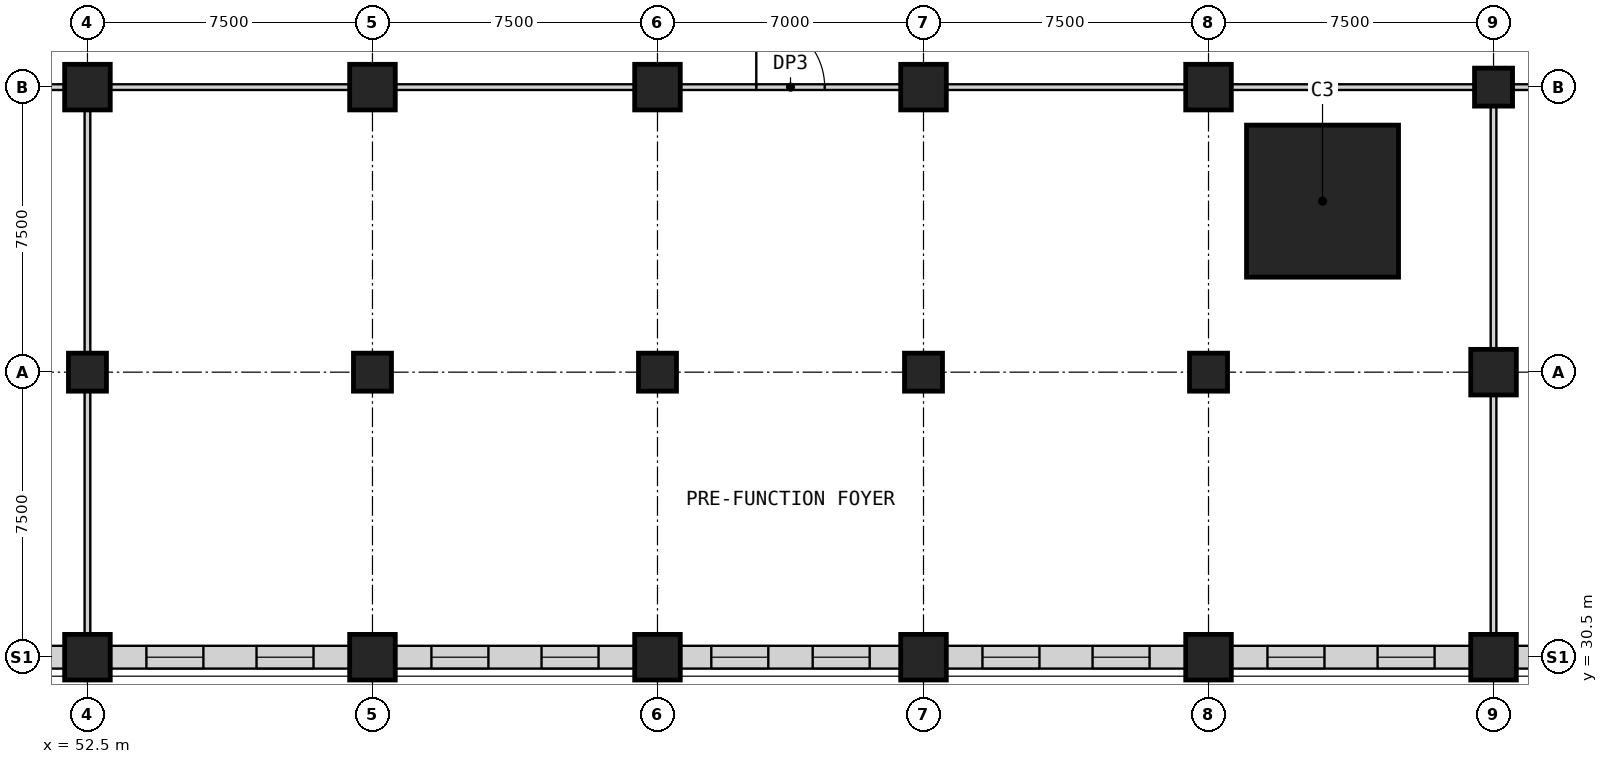
"""IFC4 building model, lengths in metres.
Left out: names, types, materials, properties, quantities, classifications, styles, units other than length and angle.
Written with IfcOpenShell. Run it as: python <this file> out.ifc"""

import sys

from ifc_helpers import new_model, si_unit, direction, frame, frame_2d, origin, origin_2d, place, context, subcontext, project, spatial, rectangle, extrude, element, fill, save


model = new_model("IFC4")
c1 = context("Model", 3, precision=1e-05, world=origin(), true_north=direction((0.0, 1.0)))
c2 = subcontext(c1, "Body", "Model", "MODEL_VIEW")
j1 = project(units=[si_unit("LENGTHUNIT", "METRE"), si_unit("PLANEANGLEUNIT", "RADIAN")], contexts=[c1])
p1 = place(None, origin())
s1 = spatial("IfcSite", under=j1, at=p1, CompositionType="ELEMENT")
p2 = place(p1, origin())
s2 = spatial("IfcBuilding", under=s1, at=p2, CompositionType="ELEMENT")
p3 = place(p2, frame((0.0, 0.0, 23.5)))
s3 = spatial("IfcBuildingStorey", under=s2, at=p3, CompositionType="ELEMENT", Elevation=23.5)
p4 = place(p3, frame((52.5, 38.0, 0.0), z_axis=(0.0, 0.0, 1.0), x_axis=(1.0, 0.0, 0.0)))
e1 = element("IfcColumn", 1, at=p4, inside=s3, PredefinedType="COLUMN", context=c2, shape_type="SweptSolid", body=[
    extrude(rectangle(XDim=1.0, YDim=1.0, at=origin_2d()), origin(), (0.0, 0.0, 1.0), 5.5),
])
p5 = place(p3, frame((52.5, 45.5, 0.0), z_axis=(0.0, 0.0, 1.0), x_axis=(1.0, 0.0, 0.0)))
e2 = element("IfcColumn", 2, at=p5, inside=s3, PredefinedType="COLUMN", context=c2, shape_type="SweptSolid", body=[
    extrude(rectangle(XDim=1.2, YDim=1.2, at=origin_2d()), origin(), (0.0, 0.0, 1.0), 5.5),
])
p6 = place(p3, frame((60.0, 38.0, 0.0), z_axis=(0.0, 0.0, 1.0), x_axis=(1.0, 0.0, 0.0)))
e3 = element("IfcColumn", 3, at=p6, inside=s3, PredefinedType="COLUMN", context=c2, shape_type="SweptSolid", body=[
    extrude(rectangle(XDim=1.0, YDim=1.0, at=origin_2d()), origin(), (0.0, 0.0, 1.0), 5.5),
])
p7 = place(p3, frame((60.0, 45.5, 0.0), z_axis=(0.0, 0.0, 1.0), x_axis=(1.0, 0.0, 0.0)))
e4 = element("IfcColumn", 4, at=p7, inside=s3, PredefinedType="COLUMN", context=c2, shape_type="SweptSolid", body=[
    extrude(rectangle(XDim=1.2, YDim=1.2, at=origin_2d()), origin(), (0.0, 0.0, 1.0), 5.5),
])
p8 = place(p3, frame((67.5, 38.0, 0.0), z_axis=(0.0, 0.0, 1.0), x_axis=(1.0, 0.0, 0.0)))
e5 = element("IfcColumn", 5, at=p8, inside=s3, PredefinedType="COLUMN", context=c2, shape_type="SweptSolid", body=[
    extrude(rectangle(XDim=1.0, YDim=1.0, at=origin_2d()), origin(), (0.0, 0.0, 1.0), 5.5),
])
p9 = place(p3, frame((67.5, 45.5, 0.0), z_axis=(0.0, 0.0, 1.0), x_axis=(1.0, 0.0, 0.0)))
e6 = element("IfcColumn", 6, at=p9, inside=s3, PredefinedType="COLUMN", context=c2, shape_type="SweptSolid", body=[
    extrude(rectangle(XDim=1.2, YDim=1.2, at=origin_2d()), origin(), (0.0, 0.0, 1.0), 5.5),
])
p10 = place(p3, frame((74.5, 38.0, 0.0), z_axis=(0.0, 0.0, 1.0), x_axis=(1.0, 0.0, 0.0)))
e7 = element("IfcColumn", 7, at=p10, inside=s3, PredefinedType="COLUMN", context=c2, shape_type="SweptSolid", body=[
    extrude(rectangle(XDim=1.0, YDim=1.0, at=origin_2d()), origin(), (0.0, 0.0, 1.0), 5.5),
])
p11 = place(p3, frame((74.5, 45.5, 0.0), z_axis=(0.0, 0.0, 1.0), x_axis=(1.0, 0.0, 0.0)))
e8 = element("IfcColumn", 8, at=p11, inside=s3, PredefinedType="COLUMN", context=c2, shape_type="SweptSolid", body=[
    extrude(rectangle(XDim=1.2, YDim=1.2, at=origin_2d()), origin(), (0.0, 0.0, 1.0), 5.5),
])
p12 = place(p3, frame((82.0, 38.0, 0.0), z_axis=(0.0, 0.0, 1.0), x_axis=(1.0, 0.0, 0.0)))
e9 = element("IfcColumn", 9, at=p12, inside=s3, PredefinedType="COLUMN", context=c2, shape_type="SweptSolid", body=[
    extrude(rectangle(XDim=1.0, YDim=1.0, at=origin_2d()), origin(), (0.0, 0.0, 1.0), 5.5),
])
p13 = place(p3, frame((82.0, 45.5, 0.0), z_axis=(0.0, 0.0, 1.0), x_axis=(1.0, 0.0, 0.0)))
e10 = element("IfcColumn", 10, at=p13, inside=s3, PredefinedType="COLUMN", context=c2, shape_type="SweptSolid", body=[
    extrude(rectangle(XDim=1.2, YDim=1.2, at=origin_2d()), origin(), (0.0, 0.0, 1.0), 5.5),
])
p14 = place(p3, frame((89.5, 45.5, 0.0), z_axis=(0.0, 0.0, 1.0), x_axis=(1.0, 0.0, 0.0)))
e11 = element("IfcColumn", 11, at=p14, inside=s3, PredefinedType="COLUMN", context=c2, shape_type="SweptSolid", body=[
    extrude(rectangle(XDim=1.0, YDim=1.0, at=origin_2d()), origin(), (0.0, 0.0, 1.0), 5.5),
])
p15 = place(p3, frame((85.0, 42.5, 0.0), z_axis=(0.0, 0.0, 1.0), x_axis=(1.0, 0.0, 0.0)))
e12 = element("IfcColumn", 12, at=p15, inside=s3, PredefinedType="COLUMN", context=c2, shape_type="SweptSolid", body=[
    extrude(rectangle(XDim=4.0, YDim=4.0, at=origin_2d()), origin(), (0.0, 0.0, 1.0), 5.5),
])
for number, where, z_axis, x_axis in (
    (13, (52.5, 30.5, 0.0), (0.0, 0.0, 1.0), (1.0, 0.0, 0.0)),
    (14, (60.0, 30.5, 0.0), (0.0, 0.0, 1.0), (1.0, 0.0, 0.0)),
    (15, (67.5, 30.5, 0.0), (0.0, 0.0, 1.0), (1.0, 0.0, 0.0)),
    (16, (74.5, 30.5, 0.0), (0.0, 0.0, 1.0), (1.0, 0.0, 0.0)),
    (17, (82.0, 30.5, 0.0), (0.0, 0.0, 1.0), (1.0, 0.0, 0.0)),
    (18, (89.5, 30.5, 0.0), (0.0, 0.0, 1.0), (1.0, 0.0, 0.0)),
    (19, (89.5, 38.0, 0.0), (0.0, 0.0, 1.0), (1.0, 0.0, 0.0)),
):
    element("IfcColumn", number, at=place(p3, frame(where, z_axis=z_axis, x_axis=x_axis)), inside=s3, PredefinedType="COLUMN", context=c2, shape_type="SweptSolid", body=[
        extrude(rectangle(XDim=1.2, YDim=1.2, at=origin_2d()), origin(), (0.0, 0.0, 1.0), 5.5),
    ])
p16 = place(p3, frame((45.6, 30.5, 0.0), z_axis=(0.0, 0.0, 1.0), x_axis=(1.0, 0.0, 0.0)))
e20 = element("IfcWall", 20, at=p16, inside=s3, PredefinedType="PARTITIONING", context=c2, shape_type="SweptSolid", body=[
    extrude(rectangle(XDim=6.3, YDim=0.6, at=frame_2d((3.15, 0.0))), origin(), (0.0, 0.0, 1.0), 4.6),
])
p17 = place(p16, frame((0.951, 0.0, 0.9)))
e21 = element("IfcOpeningElement", 21, at=p17, cuts=e20, PredefinedType="OPENING", context=c2, shape_type="SweptSolid", body=[
    extrude(rectangle(XDim=1.5, YDim=2.8, at=frame_2d((0.75, 1.4))), frame((0.0, 0.31, 0.0), z_axis=(0.0, -1.0, 0.0), x_axis=(1.0, 0.0, 0.0)), (0.0, 0.0, 1.0), 0.62),
])
p18 = place(p16, frame((3.849, 0.0, 0.9)))
e22 = element("IfcOpeningElement", 22, at=p18, cuts=e20, PredefinedType="OPENING", context=c2, shape_type="SweptSolid", body=[
    extrude(rectangle(XDim=1.5, YDim=2.8, at=frame_2d((0.75, 1.4))), frame((0.0, 0.31, 0.0), z_axis=(0.0, -1.0, 0.0), x_axis=(1.0, 0.0, 0.0)), (0.0, 0.0, 1.0), 0.62),
])
p19 = place(p3, frame((53.1, 30.5, 0.0), z_axis=(0.0, 0.0, 1.0), x_axis=(1.0, 0.0, 0.0)))
e23 = element("IfcWall", 23, at=p19, inside=s3, PredefinedType="PARTITIONING", context=c2, shape_type="SweptSolid", body=[
    extrude(rectangle(XDim=6.3, YDim=0.6, at=frame_2d((3.15, 0.0))), origin(), (0.0, 0.0, 1.0), 4.6),
])
p20 = place(p19, frame((0.951, 0.0, 0.9)))
e24 = element("IfcOpeningElement", 24, at=p20, cuts=e23, PredefinedType="OPENING", context=c2, shape_type="SweptSolid", body=[
    extrude(rectangle(XDim=1.5, YDim=2.8, at=frame_2d((0.75, 1.4))), frame((0.0, 0.31, 0.0), z_axis=(0.0, -1.0, 0.0), x_axis=(1.0, 0.0, 0.0)), (0.0, 0.0, 1.0), 0.62),
])
p21 = place(p19, frame((3.849, 0.0, 0.9)))
e25 = element("IfcOpeningElement", 25, at=p21, cuts=e23, PredefinedType="OPENING", context=c2, shape_type="SweptSolid", body=[
    extrude(rectangle(XDim=1.5, YDim=2.8, at=frame_2d((0.75, 1.4))), frame((0.0, 0.31, 0.0), z_axis=(0.0, -1.0, 0.0), x_axis=(1.0, 0.0, 0.0)), (0.0, 0.0, 1.0), 0.62),
])
p22 = place(p3, frame((60.6, 30.5, 0.0), z_axis=(0.0, 0.0, 1.0), x_axis=(1.0, 0.0, 0.0)))
e26 = element("IfcWall", 26, at=p22, inside=s3, PredefinedType="PARTITIONING", context=c2, shape_type="SweptSolid", body=[
    extrude(rectangle(XDim=6.3, YDim=0.6, at=frame_2d((3.15, 0.0))), origin(), (0.0, 0.0, 1.0), 4.6),
])
p23 = place(p22, frame((0.951, 0.0, 0.9)))
e27 = element("IfcOpeningElement", 27, at=p23, cuts=e26, PredefinedType="OPENING", context=c2, shape_type="SweptSolid", body=[
    extrude(rectangle(XDim=1.5, YDim=2.8, at=frame_2d((0.75, 1.4))), frame((0.0, 0.31, 0.0), z_axis=(0.0, -1.0, 0.0), x_axis=(1.0, 0.0, 0.0)), (0.0, 0.0, 1.0), 0.62),
])
p24 = place(p22, frame((3.849, 0.0, 0.9)))
e28 = element("IfcOpeningElement", 28, at=p24, cuts=e26, PredefinedType="OPENING", context=c2, shape_type="SweptSolid", body=[
    extrude(rectangle(XDim=1.5, YDim=2.8, at=frame_2d((0.75, 1.4))), frame((0.0, 0.31, 0.0), z_axis=(0.0, -1.0, 0.0), x_axis=(1.0, 0.0, 0.0)), (0.0, 0.0, 1.0), 0.62),
])
p25 = place(p3, frame((68.1, 30.5, 0.0), z_axis=(0.0, 0.0, 1.0), x_axis=(1.0, 0.0, 0.0)))
e29 = element("IfcWall", 29, at=p25, inside=s3, PredefinedType="PARTITIONING", context=c2, shape_type="SweptSolid", body=[
    extrude(rectangle(XDim=5.8, YDim=0.6, at=frame_2d((2.9, 0.0))), origin(), (0.0, 0.0, 1.0), 4.6),
])
p26 = place(p25, frame((0.816, 0.0, 0.9)))
e30 = element("IfcOpeningElement", 30, at=p26, cuts=e29, PredefinedType="OPENING", context=c2, shape_type="SweptSolid", body=[
    extrude(rectangle(XDim=1.5, YDim=2.8, at=frame_2d((0.75, 1.4))), frame((0.0, 0.31, 0.0), z_axis=(0.0, -1.0, 0.0), x_axis=(1.0, 0.0, 0.0)), (0.0, 0.0, 1.0), 0.62),
])
p27 = place(p25, frame((3.484, 0.0, 0.9)))
e31 = element("IfcOpeningElement", 31, at=p27, cuts=e29, PredefinedType="OPENING", context=c2, shape_type="SweptSolid", body=[
    extrude(rectangle(XDim=1.5, YDim=2.8, at=frame_2d((0.75, 1.4))), frame((0.0, 0.31, 0.0), z_axis=(0.0, -1.0, 0.0), x_axis=(1.0, 0.0, 0.0)), (0.0, 0.0, 1.0), 0.62),
])
p28 = place(p3, frame((75.1, 30.5, 0.0), z_axis=(0.0, 0.0, 1.0), x_axis=(1.0, 0.0, 0.0)))
e32 = element("IfcWall", 32, at=p28, inside=s3, PredefinedType="PARTITIONING", context=c2, shape_type="SweptSolid", body=[
    extrude(rectangle(XDim=6.3, YDim=0.6, at=frame_2d((3.15, 0.0))), origin(), (0.0, 0.0, 1.0), 4.6),
])
p29 = place(p28, frame((0.951, 0.0, 0.9)))
e33 = element("IfcOpeningElement", 33, at=p29, cuts=e32, PredefinedType="OPENING", context=c2, shape_type="SweptSolid", body=[
    extrude(rectangle(XDim=1.5, YDim=2.8, at=frame_2d((0.75, 1.4))), frame((0.0, 0.31, 0.0), z_axis=(0.0, -1.0, 0.0), x_axis=(1.0, 0.0, 0.0)), (0.0, 0.0, 1.0), 0.62),
])
p30 = place(p28, frame((3.849, 0.0, 0.9)))
e34 = element("IfcOpeningElement", 34, at=p30, cuts=e32, PredefinedType="OPENING", context=c2, shape_type="SweptSolid", body=[
    extrude(rectangle(XDim=1.5, YDim=2.8, at=frame_2d((0.75, 1.4))), frame((0.0, 0.31, 0.0), z_axis=(0.0, -1.0, 0.0), x_axis=(1.0, 0.0, 0.0)), (0.0, 0.0, 1.0), 0.62),
])
p31 = place(p3, frame((82.6, 30.5, 0.0), z_axis=(0.0, 0.0, 1.0), x_axis=(1.0, 0.0, 0.0)))
e35 = element("IfcWall", 35, at=p31, inside=s3, PredefinedType="PARTITIONING", context=c2, shape_type="SweptSolid", body=[
    extrude(rectangle(XDim=6.3, YDim=0.6, at=frame_2d((3.15, 0.0))), origin(), (0.0, 0.0, 1.0), 4.6),
])
p32 = place(p31, frame((0.951, 0.0, 0.9)))
e36 = element("IfcOpeningElement", 36, at=p32, cuts=e35, PredefinedType="OPENING", context=c2, shape_type="SweptSolid", body=[
    extrude(rectangle(XDim=1.5, YDim=2.8, at=frame_2d((0.75, 1.4))), frame((0.0, 0.31, 0.0), z_axis=(0.0, -1.0, 0.0), x_axis=(1.0, 0.0, 0.0)), (0.0, 0.0, 1.0), 0.62),
])
p33 = place(p31, frame((3.849, 0.0, 0.9)))
e37 = element("IfcOpeningElement", 37, at=p33, cuts=e35, PredefinedType="OPENING", context=c2, shape_type="SweptSolid", body=[
    extrude(rectangle(XDim=1.5, YDim=2.8, at=frame_2d((0.75, 1.4))), frame((0.0, 0.31, 0.0), z_axis=(0.0, -1.0, 0.0), x_axis=(1.0, 0.0, 0.0)), (0.0, 0.0, 1.0), 0.62),
])
p34 = place(p3, frame((90.1, 30.5, 0.0), z_axis=(0.0, 0.0, 1.0), x_axis=(1.0, 0.0, 0.0)))
e38 = element("IfcWall", 38, at=p34, inside=s3, PredefinedType="PARTITIONING", context=c2, shape_type="SweptSolid", body=[
    extrude(rectangle(XDim=6.3, YDim=0.6, at=frame_2d((3.15, 0.0))), origin(), (0.0, 0.0, 1.0), 4.6),
])
p35 = place(p34, frame((0.951, 0.0, 0.9)))
e39 = element("IfcOpeningElement", 39, at=p35, cuts=e38, PredefinedType="OPENING", context=c2, shape_type="SweptSolid", body=[
    extrude(rectangle(XDim=1.5, YDim=2.8, at=frame_2d((0.75, 1.4))), frame((0.0, 0.31, 0.0), z_axis=(0.0, -1.0, 0.0), x_axis=(1.0, 0.0, 0.0)), (0.0, 0.0, 1.0), 0.62),
])
p36 = place(p34, frame((3.849, 0.0, 0.9)))
e40 = element("IfcOpeningElement", 40, at=p36, cuts=e38, PredefinedType="OPENING", context=c2, shape_type="SweptSolid", body=[
    extrude(rectangle(XDim=1.5, YDim=2.8, at=frame_2d((0.75, 1.4))), frame((0.0, 0.31, 0.0), z_axis=(0.0, -1.0, 0.0), x_axis=(1.0, 0.0, 0.0)), (0.0, 0.0, 1.0), 0.62),
])
p37 = place(p3, frame((45.6, 45.5, 0.0), z_axis=(0.0, 0.0, 1.0), x_axis=(1.0, 0.0, 0.0)))
e41 = element("IfcWall", 41, at=p37, inside=s3, PredefinedType="PARTITIONING", context=c2, shape_type="SweptSolid", body=[
    extrude(rectangle(XDim=6.3, YDim=0.15, at=frame_2d((3.15, 0.0))), origin(), (0.0, 0.0, 1.0), 5.2),
])
p38 = place(p37, frame((2.25, 0.0, 0.0)))
e42 = element("IfcOpeningElement", 42, at=p38, cuts=e41, PredefinedType="OPENING", context=c2, shape_type="SweptSolid", body=[
    extrude(rectangle(XDim=1.8, YDim=2.4, at=frame_2d((0.9, 1.2))), frame((0.0, 0.085, 0.0), z_axis=(0.0, -1.0, 0.0), x_axis=(1.0, 0.0, 0.0)), (0.0, 0.0, 1.0), 0.17),
])
for number, where, z_axis, x_axis in (
    (43, (53.1, 45.5, 0.0), (0.0, 0.0, 1.0), (1.0, 0.0, 0.0)),
    (44, (60.6, 45.5, 0.0), (0.0, 0.0, 1.0), (1.0, 0.0, 0.0)),
):
    element("IfcWall", number, at=place(p3, frame(where, z_axis=z_axis, x_axis=x_axis)), inside=s3, PredefinedType="PARTITIONING", context=c2, shape_type="SweptSolid", body=[
        extrude(rectangle(XDim=6.3, YDim=0.15, at=frame_2d((3.15, 0.0))), origin(), (0.0, 0.0, 1.0), 5.2),
    ])
p39 = place(p3, frame((68.1, 45.5, 0.0), z_axis=(0.0, 0.0, 1.0), x_axis=(1.0, 0.0, 0.0)))
e45 = element("IfcWall", 45, at=p39, inside=s3, PredefinedType="PARTITIONING", context=c2, shape_type="SweptSolid", body=[
    extrude(rectangle(XDim=5.8, YDim=0.15, at=frame_2d((2.9, 0.0))), origin(), (0.0, 0.0, 1.0), 5.2),
])
p40 = place(p39, frame((2.0, 0.0, 0.0)))
e46 = element("IfcOpeningElement", 46, at=p40, cuts=e45, PredefinedType="OPENING", context=c2, shape_type="SweptSolid", body=[
    extrude(rectangle(XDim=1.8, YDim=2.4, at=frame_2d((0.9, 1.2))), frame((0.0, 0.085, 0.0), z_axis=(0.0, -1.0, 0.0), x_axis=(1.0, 0.0, 0.0)), (0.0, 0.0, 1.0), 0.17),
])
p41 = place(p3, frame((75.1, 45.5, 0.0), z_axis=(0.0, 0.0, 1.0), x_axis=(1.0, 0.0, 0.0)))
e47 = element("IfcWall", 47, at=p41, inside=s3, PredefinedType="PARTITIONING", context=c2, shape_type="SweptSolid", body=[
    extrude(rectangle(XDim=6.3, YDim=0.15, at=frame_2d((3.15, 0.0))), origin(), (0.0, 0.0, 1.0), 5.2),
])
for number, where, z_axis, x_axis in (
    (48, (82.6, 45.5, 0.0), (0.0, 0.0, 1.0), (1.0, 0.0, 0.0)),
    (49, (90.0, 45.5, 0.0), (0.0, 0.0, 1.0), (1.0, 0.0, 0.0)),
    (50, (52.5, 31.1, 0.0), (0.0, 0.0, 1.0), (0.0, 1.0, 0.0)),
    (51, (52.5, 38.5, 0.0), (0.0, 0.0, 1.0), (0.0, 1.0, 0.0)),
):
    element("IfcWall", number, at=place(p3, frame(where, z_axis=z_axis, x_axis=x_axis)), inside=s3, PredefinedType="PARTITIONING", context=c2, shape_type="SweptSolid", body=[
        extrude(rectangle(XDim=6.4, YDim=0.15, at=frame_2d((3.2, 0.0))), origin(), (0.0, 0.0, 1.0), 5.2),
    ])
p42 = place(p3, frame((89.5, 31.1, 0.0), z_axis=(0.0, 0.0, 1.0), x_axis=(0.0, 1.0, 0.0)))
e52 = element("IfcWall", 52, at=p42, inside=s3, PredefinedType="PARTITIONING", context=c2, shape_type="SweptSolid", body=[
    extrude(rectangle(XDim=6.3, YDim=0.15, at=frame_2d((3.15, 0.0))), origin(), (0.0, 0.0, 1.0), 5.2),
])
p43 = place(p3, frame((89.5, 38.6, 0.0), z_axis=(0.0, 0.0, 1.0), x_axis=(0.0, 1.0, 0.0)))
e53 = element("IfcWall", 53, at=p43, inside=s3, PredefinedType="PARTITIONING", context=c2, shape_type="SweptSolid", body=[
    extrude(rectangle(XDim=6.4, YDim=0.15, at=frame_2d((3.2, 0.0))), origin(), (0.0, 0.0, 1.0), 5.2),
])
p44 = place(p20, origin())
e54 = element("IfcWindow", 54, at=p44, inside=s3, PartitioningType="SINGLE_PANEL", PredefinedType="WINDOW", context=c2, shape_type="SweptSolid", body=[
    extrude(rectangle(XDim=1.5, YDim=2.8, at=frame_2d((0.75, 1.4))), frame((0.0, 0.03, 0.0), z_axis=(0.0, -1.0, 0.0), x_axis=(1.0, 0.0, 0.0)), (0.0, 0.0, 1.0), 0.06),
])
fill(e24, e54)
p45 = place(p21, origin())
e55 = element("IfcWindow", 55, at=p45, inside=s3, PartitioningType="SINGLE_PANEL", PredefinedType="WINDOW", context=c2, shape_type="SweptSolid", body=[
    extrude(rectangle(XDim=1.5, YDim=2.8, at=frame_2d((0.75, 1.4))), frame((0.0, 0.03, 0.0), z_axis=(0.0, -1.0, 0.0), x_axis=(1.0, 0.0, 0.0)), (0.0, 0.0, 1.0), 0.06),
])
fill(e25, e55)
p46 = place(p23, origin())
e56 = element("IfcWindow", 56, at=p46, inside=s3, PartitioningType="SINGLE_PANEL", PredefinedType="WINDOW", context=c2, shape_type="SweptSolid", body=[
    extrude(rectangle(XDim=1.5, YDim=2.8, at=frame_2d((0.75, 1.4))), frame((0.0, 0.03, 0.0), z_axis=(0.0, -1.0, 0.0), x_axis=(1.0, 0.0, 0.0)), (0.0, 0.0, 1.0), 0.06),
])
fill(e27, e56)
p47 = place(p24, origin())
e57 = element("IfcWindow", 57, at=p47, inside=s3, PartitioningType="SINGLE_PANEL", PredefinedType="WINDOW", context=c2, shape_type="SweptSolid", body=[
    extrude(rectangle(XDim=1.5, YDim=2.8, at=frame_2d((0.75, 1.4))), frame((0.0, 0.03, 0.0), z_axis=(0.0, -1.0, 0.0), x_axis=(1.0, 0.0, 0.0)), (0.0, 0.0, 1.0), 0.06),
])
fill(e28, e57)
p48 = place(p26, origin())
e58 = element("IfcWindow", 58, at=p48, inside=s3, PartitioningType="SINGLE_PANEL", PredefinedType="WINDOW", context=c2, shape_type="SweptSolid", body=[
    extrude(rectangle(XDim=1.5, YDim=2.8, at=frame_2d((0.75, 1.4))), frame((0.0, 0.03, 0.0), z_axis=(0.0, -1.0, 0.0), x_axis=(1.0, 0.0, 0.0)), (0.0, 0.0, 1.0), 0.06),
])
fill(e30, e58)
p49 = place(p27, origin())
e59 = element("IfcWindow", 59, at=p49, inside=s3, PartitioningType="SINGLE_PANEL", PredefinedType="WINDOW", context=c2, shape_type="SweptSolid", body=[
    extrude(rectangle(XDim=1.5, YDim=2.8, at=frame_2d((0.75, 1.4))), frame((0.0, 0.03, 0.0), z_axis=(0.0, -1.0, 0.0), x_axis=(1.0, 0.0, 0.0)), (0.0, 0.0, 1.0), 0.06),
])
fill(e31, e59)
p50 = place(p29, origin())
e60 = element("IfcWindow", 60, at=p50, inside=s3, PartitioningType="SINGLE_PANEL", PredefinedType="WINDOW", context=c2, shape_type="SweptSolid", body=[
    extrude(rectangle(XDim=1.5, YDim=2.8, at=frame_2d((0.75, 1.4))), frame((0.0, 0.03, 0.0), z_axis=(0.0, -1.0, 0.0), x_axis=(1.0, 0.0, 0.0)), (0.0, 0.0, 1.0), 0.06),
])
fill(e33, e60)
p51 = place(p30, origin())
e61 = element("IfcWindow", 61, at=p51, inside=s3, PartitioningType="SINGLE_PANEL", PredefinedType="WINDOW", context=c2, shape_type="SweptSolid", body=[
    extrude(rectangle(XDim=1.5, YDim=2.8, at=frame_2d((0.75, 1.4))), frame((0.0, 0.03, 0.0), z_axis=(0.0, -1.0, 0.0), x_axis=(1.0, 0.0, 0.0)), (0.0, 0.0, 1.0), 0.06),
])
fill(e34, e61)
p52 = place(p32, origin())
e62 = element("IfcWindow", 62, at=p52, inside=s3, PartitioningType="SINGLE_PANEL", PredefinedType="WINDOW", context=c2, shape_type="SweptSolid", body=[
    extrude(rectangle(XDim=1.5, YDim=2.8, at=frame_2d((0.75, 1.4))), frame((0.0, 0.03, 0.0), z_axis=(0.0, -1.0, 0.0), x_axis=(1.0, 0.0, 0.0)), (0.0, 0.0, 1.0), 0.06),
])
fill(e36, e62)
p53 = place(p33, origin())
e63 = element("IfcWindow", 63, at=p53, inside=s3, PartitioningType="SINGLE_PANEL", PredefinedType="WINDOW", context=c2, shape_type="SweptSolid", body=[
    extrude(rectangle(XDim=1.5, YDim=2.8, at=frame_2d((0.75, 1.4))), frame((0.0, 0.03, 0.0), z_axis=(0.0, -1.0, 0.0), x_axis=(1.0, 0.0, 0.0)), (0.0, 0.0, 1.0), 0.06),
])
fill(e37, e63)
p54 = place(p40, origin())
e64 = element("IfcDoor", 64, at=p54, inside=s3, OperationType="SINGLE_SWING_LEFT", PredefinedType="DOOR", context=c2, shape_type="SweptSolid", body=[
    extrude(rectangle(XDim=1.8, YDim=2.4, at=frame_2d((0.9, 1.2))), frame((0.0, 0.025, 0.0), z_axis=(0.0, -1.0, 0.0), x_axis=(1.0, 0.0, 0.0)), (0.0, 0.0, 1.0), 0.05),
])
fill(e46, e64)
save(model, sys.argv[1])
